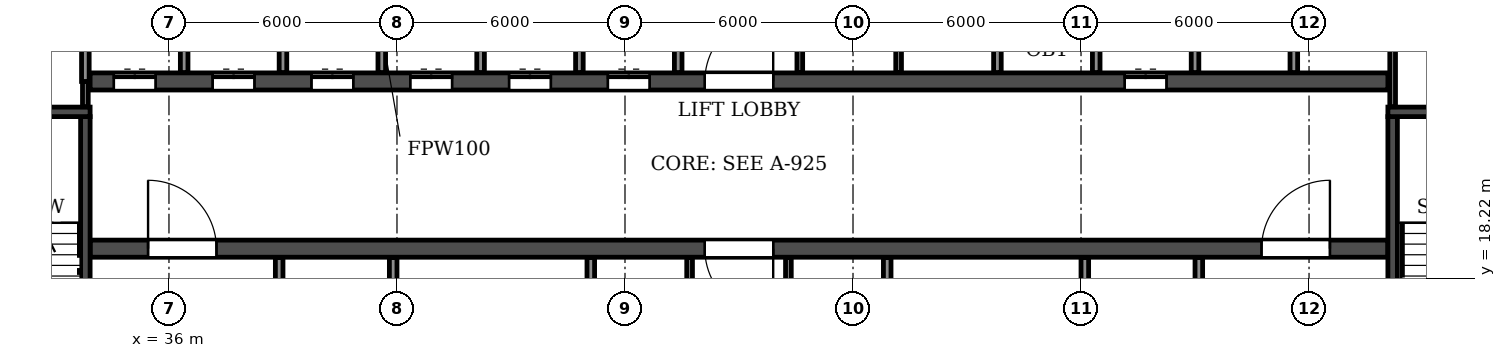
"""IFC4 building model, lengths in metres.
Left out: names, types, materials, properties, quantities, classifications, styles, units other than length and angle.
Written with IfcOpenShell. Run it as: python <this file> out.ifc"""

import sys

from ifc_helpers import new_model, si_unit, direction, frame, frame_2d, origin, place, context, subcontext, project, spatial, rectangle, extrude, element, fill, save


model = new_model("IFC4")
c1 = context("Model", 3, precision=1e-05, world=origin(), true_north=direction((0.0, 1.0)))
c2 = subcontext(c1, "Body", "Model", "MODEL_VIEW")
j1 = project(units=[si_unit("LENGTHUNIT", "METRE"), si_unit("PLANEANGLEUNIT", "RADIAN")], contexts=[c1])
p1 = place(None, origin())
s1 = spatial("IfcSite", under=j1, at=p1, CompositionType="ELEMENT")
p2 = place(p1, origin())
s2 = spatial("IfcBuilding", under=s1, at=p2, CompositionType="ELEMENT")
p3 = place(p2, frame((0.0, 0.0, 132.3)))
s3 = spatial("IfcBuildingStorey", under=s2, at=p3, CompositionType="ELEMENT", Elevation=132.3)
p4 = place(p3, frame((33.925, 19.0, 0.0), z_axis=(0.0, 0.0, 1.0), x_axis=(1.0, 0.0, 0.0)))
e1 = element("IfcWall", 1, at=p4, inside=s3, PredefinedType="SOLIDWALL", context=c2, shape_type="SweptSolid", body=[
    extrude(rectangle(XDim=34.15, YDim=0.45, at=frame_2d((17.075, 0.0))), origin(), (0.0, 0.0, 1.0), 3.07),
])
p5 = place(p4, frame((16.175, 0.0, 0.0)))
e2 = element("IfcOpeningElement", 2, at=p5, cuts=e1, PredefinedType="OPENING", context=c2, shape_type="SweptSolid", body=[
    extrude(rectangle(XDim=1.8, YDim=2.1, at=frame_2d((0.9, 1.05))), frame((0.0, 0.235, 0.0), z_axis=(0.0, -1.0, 0.0), x_axis=(1.0, 0.0, 0.0)), (0.0, 0.0, 1.0), 0.47),
])
p6 = place(p4, frame((1.525, 0.0, 0.0)))
e3 = element("IfcOpeningElement", 3, at=p6, cuts=e1, PredefinedType="OPENING", context=c2, shape_type="SweptSolid", body=[
    extrude(rectangle(XDim=1.8, YDim=2.1, at=frame_2d((0.9, 1.05))), frame((0.0, 0.235, 0.0), z_axis=(0.0, -1.0, 0.0), x_axis=(1.0, 0.0, 0.0)), (0.0, 0.0, 1.0), 0.47),
])
p7 = place(p4, frame((30.825, 0.0, 0.0)))
e4 = element("IfcOpeningElement", 4, at=p7, cuts=e1, PredefinedType="OPENING", context=c2, shape_type="SweptSolid", body=[
    extrude(rectangle(XDim=1.8, YDim=2.1, at=frame_2d((0.9, 1.05))), frame((0.0, 0.235, 0.0), z_axis=(0.0, -1.0, 0.0), x_axis=(1.0, 0.0, 0.0)), (0.0, 0.0, 1.0), 0.47),
])
p8 = place(p3, frame((33.925, 23.4, 0.0), z_axis=(0.0, 0.0, 1.0), x_axis=(1.0, 0.0, 0.0)))
e5 = element("IfcWall", 5, at=p8, inside=s3, PredefinedType="SOLIDWALL", context=c2, shape_type="SweptSolid", body=[
    extrude(rectangle(XDim=34.15, YDim=0.45, at=frame_2d((17.075, 0.0))), origin(), (0.0, 0.0, 1.0), 3.07),
])
p9 = place(p8, frame((16.175, 0.0, 0.0)))
e6 = element("IfcOpeningElement", 6, at=p9, cuts=e5, PredefinedType="OPENING", context=c2, shape_type="SweptSolid", body=[
    extrude(rectangle(XDim=1.8, YDim=2.1, at=frame_2d((0.9, 1.05))), frame((0.0, 0.235, 0.0), z_axis=(0.0, -1.0, 0.0), x_axis=(1.0, 0.0, 0.0)), (0.0, 0.0, 1.0), 0.47),
])
p10 = place(p8, frame((0.625, 0.0, 0.0)))
e7 = element("IfcOpeningElement", 7, at=p10, cuts=e5, PredefinedType="OPENING", context=c2, shape_type="SweptSolid", body=[
    extrude(rectangle(XDim=1.1, YDim=2.1, at=frame_2d((0.55, 1.05))), frame((0.0, 0.235, 0.0), z_axis=(0.0, -1.0, 0.0), x_axis=(1.0, 0.0, 0.0)), (0.0, 0.0, 1.0), 0.47),
])
p11 = place(p8, frame((3.225, 0.0, 0.0)))
e8 = element("IfcOpeningElement", 8, at=p11, cuts=e5, PredefinedType="OPENING", context=c2, shape_type="SweptSolid", body=[
    extrude(rectangle(XDim=1.1, YDim=2.1, at=frame_2d((0.55, 1.05))), frame((0.0, 0.235, 0.0), z_axis=(0.0, -1.0, 0.0), x_axis=(1.0, 0.0, 0.0)), (0.0, 0.0, 1.0), 0.47),
])
p12 = place(p8, frame((5.825, 0.0, 0.0)))
e9 = element("IfcOpeningElement", 9, at=p12, cuts=e5, PredefinedType="OPENING", context=c2, shape_type="SweptSolid", body=[
    extrude(rectangle(XDim=1.1, YDim=2.1, at=frame_2d((0.55, 1.05))), frame((0.0, 0.235, 0.0), z_axis=(0.0, -1.0, 0.0), x_axis=(1.0, 0.0, 0.0)), (0.0, 0.0, 1.0), 0.47),
])
p13 = place(p8, frame((8.425, 0.0, 0.0)))
e10 = element("IfcOpeningElement", 10, at=p13, cuts=e5, PredefinedType="OPENING", context=c2, shape_type="SweptSolid", body=[
    extrude(rectangle(XDim=1.1, YDim=2.1, at=frame_2d((0.55, 1.05))), frame((0.0, 0.235, 0.0), z_axis=(0.0, -1.0, 0.0), x_axis=(1.0, 0.0, 0.0)), (0.0, 0.0, 1.0), 0.47),
])
p14 = place(p8, frame((11.025, 0.0, 0.0)))
e11 = element("IfcOpeningElement", 11, at=p14, cuts=e5, PredefinedType="OPENING", context=c2, shape_type="SweptSolid", body=[
    extrude(rectangle(XDim=1.1, YDim=2.1, at=frame_2d((0.55, 1.05))), frame((0.0, 0.235, 0.0), z_axis=(0.0, -1.0, 0.0), x_axis=(1.0, 0.0, 0.0)), (0.0, 0.0, 1.0), 0.47),
])
p15 = place(p8, frame((13.625, 0.0, 0.0)))
e12 = element("IfcOpeningElement", 12, at=p15, cuts=e5, PredefinedType="OPENING", context=c2, shape_type="SweptSolid", body=[
    extrude(rectangle(XDim=1.1, YDim=2.1, at=frame_2d((0.55, 1.05))), frame((0.0, 0.235, 0.0), z_axis=(0.0, -1.0, 0.0), x_axis=(1.0, 0.0, 0.0)), (0.0, 0.0, 1.0), 0.47),
])
p16 = place(p8, frame((27.225, 0.0, 0.0)))
e13 = element("IfcOpeningElement", 13, at=p16, cuts=e5, PredefinedType="OPENING", context=c2, shape_type="SweptSolid", body=[
    extrude(rectangle(XDim=1.1, YDim=2.1, at=frame_2d((0.55, 1.05))), frame((0.0, 0.235, 0.0), z_axis=(0.0, -1.0, 0.0), x_axis=(1.0, 0.0, 0.0)), (0.0, 0.0, 1.0), 0.47),
])
p17 = place(p3, frame((33.8, 14.825, 0.0), z_axis=(0.0, 0.0, 1.0), x_axis=(0.0, 1.0, 0.0)))
e14 = element("IfcWall", 14, at=p17, inside=s3, PredefinedType="SOLIDWALL", context=c2, shape_type="SweptSolid", body=[
    extrude(rectangle(XDim=7.65, YDim=0.25, at=frame_2d((3.825, 0.0))), origin(), (0.0, 0.0, 1.0), 3.07),
])
p18 = place(p17, frame((0.475, 0.0, 0.0)))
e15 = element("IfcOpeningElement", 15, at=p18, cuts=e14, PredefinedType="OPENING", context=c2, shape_type="SweptSolid", body=[
    extrude(rectangle(XDim=1.0, YDim=2.1, at=frame_2d((0.5, 1.05))), frame((0.0, 0.135, 0.0), z_axis=(0.0, -1.0, 0.0), x_axis=(1.0, 0.0, 0.0)), (0.0, 0.0, 1.0), 0.27),
])
p19 = place(p3, frame((29.875, 22.6, 0.0), z_axis=(0.0, 0.0, 1.0), x_axis=(1.0, 0.0, 0.0)))
e16 = element("IfcWall", 16, at=p19, inside=s3, PredefinedType="SOLIDWALL", context=c2, shape_type="SweptSolid", body=[
    extrude(rectangle(XDim=4.05, YDim=0.25, at=frame_2d((2.025, 0.0))), origin(), (0.0, 0.0, 1.0), 3.07),
])
p20 = place(p3, frame((68.2, 14.825, 0.0), z_axis=(0.0, 0.0, 1.0), x_axis=(0.0, 1.0, 0.0)))
e17 = element("IfcWall", 17, at=p20, inside=s3, PredefinedType="SOLIDWALL", context=c2, shape_type="SweptSolid", body=[
    extrude(rectangle(XDim=7.65, YDim=0.25, at=frame_2d((3.825, 0.0))), origin(), (0.0, 0.0, 1.0), 3.07),
])
p21 = place(p20, frame((0.475, 0.0, 0.0)))
e18 = element("IfcOpeningElement", 18, at=p21, cuts=e17, PredefinedType="OPENING", context=c2, shape_type="SweptSolid", body=[
    extrude(rectangle(XDim=1.0, YDim=2.1, at=frame_2d((0.5, 1.05))), frame((0.0, 0.135, 0.0), z_axis=(0.0, -1.0, 0.0), x_axis=(1.0, 0.0, 0.0)), (0.0, 0.0, 1.0), 0.27),
])
p22 = place(p3, frame((68.075, 22.6, 0.0), z_axis=(0.0, 0.0, 1.0), x_axis=(1.0, 0.0, 0.0)))
e19 = element("IfcWall", 19, at=p22, inside=s3, PredefinedType="SOLIDWALL", context=c2, shape_type="SweptSolid", body=[
    extrude(rectangle(XDim=4.05, YDim=0.25, at=frame_2d((2.025, 0.0))), origin(), (0.0, 0.0, 1.0), 3.07),
])
for number, where, z_axis, x_axis in (
    (20, (49.7, 14.835, 0.0), (0.0, 0.0, 1.0), (0.0, 1.0, 0.0)),
    (21, (52.3, 14.835, 0.0), (0.0, 0.0, 1.0), (0.0, 1.0, 0.0)),
    (22, (52.6, 23.635, 0.0), (0.0, 0.0, 1.0), (0.0, 1.0, 0.0)),
    (23, (55.2, 23.635, 0.0), (0.0, 0.0, 1.0), (0.0, 1.0, 0.0)),
):
    element("IfcWall", number, at=place(p3, frame(where, z_axis=z_axis, x_axis=x_axis)), inside=s3, PredefinedType="PARTITIONING", context=c2, shape_type="SweptSolid", body=[
        extrude(rectangle(XDim=3.93, YDim=0.15, at=frame_2d((1.965, 0.0))), origin(), (0.0, 0.0, 1.0), 3.07),
    ])
for number, where, z_axis, x_axis in (
    (24, (47.1, 14.835, 0.0), (0.0, 0.0, 1.0), (0.0, 1.0, 0.0)),
    (25, (54.9, 14.835, 0.0), (0.0, 0.0, 1.0), (0.0, 1.0, 0.0)),
    (26, (65.6, 23.635, 0.0), (0.0, 0.0, 1.0), (0.0, 1.0, 0.0)),
):
    element("IfcWall", number, at=place(p3, frame(where, z_axis=z_axis, x_axis=x_axis)), inside=s3, PredefinedType="PARTITIONING", context=c2, shape_type="SweptSolid", body=[
        extrude(rectangle(XDim=3.93, YDim=0.2, at=frame_2d((1.965, 0.0))), origin(), (0.0, 0.0, 1.0), 3.07),
    ])
p23 = place(p3, frame((33.8, 22.735, 0.0), z_axis=(0.0, 0.0, 1.0), x_axis=(0.0, 1.0, 0.0)))
e27 = element("IfcWall", 27, at=p23, inside=s3, PredefinedType="PARTITIONING", context=c2, shape_type="SweptSolid", body=[
    extrude(rectangle(XDim=0.665, YDim=0.15, at=frame_2d((0.333, 0.0))), origin(), (0.0, 0.0, 1.0), 3.07),
])
p24 = place(p3, frame((68.2, 22.735, 0.0), z_axis=(0.0, 0.0, 1.0), x_axis=(0.0, 1.0, 0.0)))
e28 = element("IfcWall", 28, at=p24, inside=s3, PredefinedType="PARTITIONING", context=c2, shape_type="SweptSolid", body=[
    extrude(rectangle(XDim=4.83, YDim=0.15, at=frame_2d((2.415, 0.0))), origin(), (0.0, 0.0, 1.0), 3.07),
])
p25 = place(p3, frame((33.8, 23.4, 0.0), z_axis=(0.0, 0.0, 1.0), x_axis=(0.0, 1.0, 0.0)))
e29 = element("IfcWall", 29, at=p25, inside=s3, PredefinedType="PARTITIONING", context=c2, shape_type="SweptSolid", body=[
    extrude(rectangle(XDim=2.7, YDim=0.2, at=frame_2d((1.35, 0.0))), origin(), (0.0, 0.0, 1.0), 3.07),
])
p26 = place(p3, frame((36.4, 23.635, 0.0), z_axis=(0.0, 0.0, 1.0), x_axis=(0.0, 1.0, 0.0)))
e30 = element("IfcWall", 30, at=p26, inside=s3, PredefinedType="PARTITIONING", context=c2, shape_type="SweptSolid", body=[
    extrude(rectangle(XDim=2.465, YDim=0.2, at=frame_2d((1.232, 0.0))), origin(), (0.0, 0.0, 1.0), 3.07),
])
p27 = place(p3, frame((38.9, 14.835, 0.0), z_axis=(0.0, 0.0, 1.0), x_axis=(0.0, 1.0, 0.0)))
e31 = element("IfcWall", 31, at=p27, inside=s3, PredefinedType="PARTITIONING", context=c2, shape_type="SweptSolid", body=[
    extrude(rectangle(XDim=3.93, YDim=0.2, at=frame_2d((1.965, 0.0))), origin(), (0.0, 0.0, 1.0), 3.07),
])
p28 = place(p27, frame((1.415, 0.0, 0.0)))
e32 = element("IfcOpeningElement", 32, at=p28, cuts=e31, PredefinedType="OPENING", context=c2, shape_type="SweptSolid", body=[
    extrude(rectangle(XDim=1.1, YDim=2.1, at=frame_2d((0.55, 1.05))), frame((0.0, 0.11, 0.0), z_axis=(0.0, -1.0, 0.0), x_axis=(1.0, 0.0, 0.0)), (0.0, 0.0, 1.0), 0.22),
])
for number, where, z_axis, x_axis in (
    (33, (39.0, 23.635, 0.0), (0.0, 0.0, 1.0), (0.0, 1.0, 0.0)),
    (34, (41.6, 23.635, 0.0), (0.0, 0.0, 1.0), (0.0, 1.0, 0.0)),
):
    element("IfcWall", number, at=place(p3, frame(where, z_axis=z_axis, x_axis=x_axis)), inside=s3, PredefinedType="PARTITIONING", context=c2, shape_type="SweptSolid", body=[
        extrude(rectangle(XDim=2.465, YDim=0.2, at=frame_2d((1.232, 0.0))), origin(), (0.0, 0.0, 1.0), 3.07),
    ])
for number, where, z_axis, x_axis in (
    (35, (41.9, 14.835, 0.0), (0.0, 0.0, 1.0), (0.0, 1.0, 0.0)),
    (36, (44.2, 23.635, 0.0), (0.0, 0.0, 1.0), (0.0, 1.0, 0.0)),
    (37, (46.8, 23.635, 0.0), (0.0, 0.0, 1.0), (0.0, 1.0, 0.0)),
):
    element("IfcWall", number, at=place(p3, frame(where, z_axis=z_axis, x_axis=x_axis)), inside=s3, PredefinedType="PARTITIONING", context=c2, shape_type="SweptSolid", body=[
        extrude(rectangle(XDim=3.93, YDim=0.2, at=frame_2d((1.965, 0.0))), origin(), (0.0, 0.0, 1.0), 3.07),
    ])
for number, where, z_axis, x_axis in (
    (38, (49.4, 23.635, 0.0), (0.0, 0.0, 1.0), (0.0, 1.0, 0.0)),
    (39, (57.8, 23.635, 0.0), (0.0, 0.0, 1.0), (0.0, 1.0, 0.0)),
):
    element("IfcWall", number, at=place(p3, frame(where, z_axis=z_axis, x_axis=x_axis)), inside=s3, PredefinedType="PARTITIONING", context=c2, shape_type="SweptSolid", body=[
        extrude(rectangle(XDim=2.465, YDim=0.2, at=frame_2d((1.232, 0.0))), origin(), (0.0, 0.0, 1.0), 3.07),
    ])
p29 = place(p3, frame((60.1, 14.835, 0.0), z_axis=(0.0, 0.0, 1.0), x_axis=(0.0, 1.0, 0.0)))
e40 = element("IfcWall", 40, at=p29, inside=s3, PredefinedType="PARTITIONING", context=c2, shape_type="SweptSolid", body=[
    extrude(rectangle(XDim=3.93, YDim=0.2, at=frame_2d((1.965, 0.0))), origin(), (0.0, 0.0, 1.0), 3.07),
])
for number, where, z_axis, x_axis in (
    (41, (60.4, 23.635, 0.0), (0.0, 0.0, 1.0), (0.0, 1.0, 0.0)),
    (42, (63.0, 23.635, 0.0), (0.0, 0.0, 1.0), (0.0, 1.0, 0.0)),
):
    element("IfcWall", number, at=place(p3, frame(where, z_axis=z_axis, x_axis=x_axis)), inside=s3, PredefinedType="PARTITIONING", context=c2, shape_type="SweptSolid", body=[
        extrude(rectangle(XDim=2.465, YDim=0.2, at=frame_2d((1.232, 0.0))), origin(), (0.0, 0.0, 1.0), 3.07),
    ])
p30 = place(p3, frame((63.1, 14.835, 0.0), z_axis=(0.0, 0.0, 1.0), x_axis=(0.0, 1.0, 0.0)))
e43 = element("IfcWall", 43, at=p30, inside=s3, PredefinedType="PARTITIONING", context=c2, shape_type="SweptSolid", body=[
    extrude(rectangle(XDim=3.93, YDim=0.2, at=frame_2d((1.965, 0.0))), origin(), (0.0, 0.0, 1.0), 3.07),
])
p31 = place(p30, frame((1.415, 0.0, 0.0)))
e44 = element("IfcOpeningElement", 44, at=p31, cuts=e43, PredefinedType="OPENING", context=c2, shape_type="SweptSolid", body=[
    extrude(rectangle(XDim=1.1, YDim=2.1, at=frame_2d((0.55, 1.05))), frame((0.0, 0.11, 0.0), z_axis=(0.0, -1.0, 0.0), x_axis=(1.0, 0.0, 0.0)), (0.0, 0.0, 1.0), 0.22),
])
p32 = place(p9, origin())
e45 = element("IfcDoor", 45, at=p32, inside=s3, OperationType="DOUBLE_DOOR_SINGLE_SWING", PredefinedType="DOOR", context=c2, shape_type="SweptSolid", body=[
    extrude(rectangle(XDim=1.8, YDim=2.1, at=frame_2d((0.9, 1.05))), frame((0.0, 0.025, 0.0), z_axis=(0.0, -1.0, 0.0), x_axis=(1.0, 0.0, 0.0)), (0.0, 0.0, 1.0), 0.05),
])
fill(e6, e45)
p33 = place(p5, frame((1.8, 0.0, 0.0), z_axis=(0.0, 0.0, 1.0), x_axis=(-1.0, 0.0, 0.0)))
e46 = element("IfcDoor", 46, at=p33, inside=s3, OperationType="DOUBLE_DOOR_SINGLE_SWING", PredefinedType="DOOR", context=c2, shape_type="SweptSolid", body=[
    extrude(rectangle(XDim=1.8, YDim=2.1, at=frame_2d((0.9, 1.05))), frame((0.0, 0.025, 0.0), z_axis=(0.0, -1.0, 0.0), x_axis=(1.0, 0.0, 0.0)), (0.0, 0.0, 1.0), 0.05),
])
fill(e2, e46)
p34 = place(p10, origin())
e47 = element("IfcDoor", 47, at=p34, inside=s3, OperationType="DOUBLE_DOOR_SLIDING", PredefinedType="DOOR", context=c2, shape_type="SweptSolid", body=[
    extrude(rectangle(XDim=1.1, YDim=2.1, at=frame_2d((0.55, 1.05))), frame((0.0, 0.025, 0.0), z_axis=(0.0, -1.0, 0.0), x_axis=(1.0, 0.0, 0.0)), (0.0, 0.0, 1.0), 0.05),
])
fill(e7, e47)
p35 = place(p6, origin())
e48 = element("IfcDoor", 48, at=p35, inside=s3, OperationType="DOUBLE_DOOR_SINGLE_SWING", PredefinedType="DOOR", context=c2, shape_type="SweptSolid", body=[
    extrude(rectangle(XDim=1.8, YDim=2.1, at=frame_2d((0.9, 1.05))), frame((0.0, 0.025, 0.0), z_axis=(0.0, -1.0, 0.0), x_axis=(1.0, 0.0, 0.0)), (0.0, 0.0, 1.0), 0.05),
])
fill(e3, e48)
p36 = place(p11, origin())
e49 = element("IfcDoor", 49, at=p36, inside=s3, OperationType="DOUBLE_DOOR_SLIDING", PredefinedType="DOOR", context=c2, shape_type="SweptSolid", body=[
    extrude(rectangle(XDim=1.1, YDim=2.1, at=frame_2d((0.55, 1.05))), frame((0.0, 0.025, 0.0), z_axis=(0.0, -1.0, 0.0), x_axis=(1.0, 0.0, 0.0)), (0.0, 0.0, 1.0), 0.05),
])
fill(e8, e49)
p37 = place(p12, origin())
e50 = element("IfcDoor", 50, at=p37, inside=s3, OperationType="DOUBLE_DOOR_SLIDING", PredefinedType="DOOR", context=c2, shape_type="SweptSolid", body=[
    extrude(rectangle(XDim=1.1, YDim=2.1, at=frame_2d((0.55, 1.05))), frame((0.0, 0.025, 0.0), z_axis=(0.0, -1.0, 0.0), x_axis=(1.0, 0.0, 0.0)), (0.0, 0.0, 1.0), 0.05),
])
fill(e9, e50)
p38 = place(p13, origin())
e51 = element("IfcDoor", 51, at=p38, inside=s3, OperationType="DOUBLE_DOOR_SLIDING", PredefinedType="DOOR", context=c2, shape_type="SweptSolid", body=[
    extrude(rectangle(XDim=1.1, YDim=2.1, at=frame_2d((0.55, 1.05))), frame((0.0, 0.025, 0.0), z_axis=(0.0, -1.0, 0.0), x_axis=(1.0, 0.0, 0.0)), (0.0, 0.0, 1.0), 0.05),
])
fill(e10, e51)
p39 = place(p14, origin())
e52 = element("IfcDoor", 52, at=p39, inside=s3, OperationType="DOUBLE_DOOR_SLIDING", PredefinedType="DOOR", context=c2, shape_type="SweptSolid", body=[
    extrude(rectangle(XDim=1.1, YDim=2.1, at=frame_2d((0.55, 1.05))), frame((0.0, 0.025, 0.0), z_axis=(0.0, -1.0, 0.0), x_axis=(1.0, 0.0, 0.0)), (0.0, 0.0, 1.0), 0.05),
])
fill(e11, e52)
p40 = place(p15, origin())
e53 = element("IfcDoor", 53, at=p40, inside=s3, OperationType="DOUBLE_DOOR_SLIDING", PredefinedType="DOOR", context=c2, shape_type="SweptSolid", body=[
    extrude(rectangle(XDim=1.1, YDim=2.1, at=frame_2d((0.55, 1.05))), frame((0.0, 0.025, 0.0), z_axis=(0.0, -1.0, 0.0), x_axis=(1.0, 0.0, 0.0)), (0.0, 0.0, 1.0), 0.05),
])
fill(e12, e53)
p41 = place(p16, origin())
e54 = element("IfcDoor", 54, at=p41, inside=s3, OperationType="DOUBLE_DOOR_SLIDING", PredefinedType="DOOR", context=c2, shape_type="SweptSolid", body=[
    extrude(rectangle(XDim=1.1, YDim=2.1, at=frame_2d((0.55, 1.05))), frame((0.0, 0.025, 0.0), z_axis=(0.0, -1.0, 0.0), x_axis=(1.0, 0.0, 0.0)), (0.0, 0.0, 1.0), 0.05),
])
fill(e13, e54)
p42 = place(p7, origin())
e55 = element("IfcDoor", 55, at=p42, inside=s3, OperationType="DOUBLE_DOOR_SINGLE_SWING", PredefinedType="DOOR", context=c2, shape_type="SweptSolid", body=[
    extrude(rectangle(XDim=1.8, YDim=2.1, at=frame_2d((0.9, 1.05))), frame((0.0, 0.025, 0.0), z_axis=(0.0, -1.0, 0.0), x_axis=(1.0, 0.0, 0.0)), (0.0, 0.0, 1.0), 0.05),
])
fill(e4, e55)
save(model, sys.argv[1])
